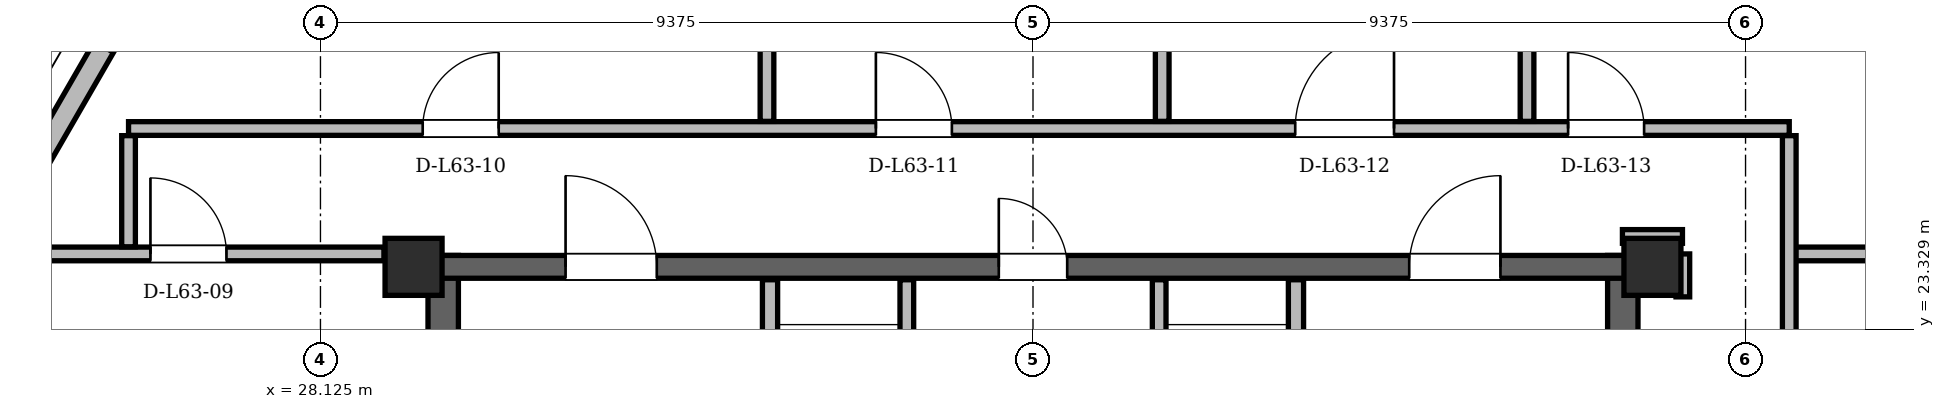
"""IFC4 building model, lengths in metres.
Left out: names, types, materials, properties, quantities, classifications, styles, units other than length and angle.
Written with IfcOpenShell. Run it as: python <this file> out.ifc"""

import sys

from ifc_helpers import new_model, si_unit, direction, frame, frame_2d, origin, origin_2d, place, context, subcontext, project, spatial, rectangle, hollow_rectangle, extrude, element, fill, save


model = new_model("IFC4")
c1 = context("Model", 3, precision=1e-05, world=origin(), true_north=direction((0.0, 1.0)))
c2 = subcontext(c1, "Body", "Model", "MODEL_VIEW")
j1 = project(units=[si_unit("LENGTHUNIT", "METRE"), si_unit("PLANEANGLEUNIT", "RADIAN")], contexts=[c1])
p1 = place(None, origin())
s1 = spatial("IfcSite", under=j1, at=p1, CompositionType="ELEMENT")
p2 = place(p1, origin())
s2 = spatial("IfcBuilding", under=s1, at=p2, CompositionType="ELEMENT")
p3 = place(p2, frame((0.0, 0.0, 237.9)))
s3 = spatial("IfcBuildingStorey", under=s2, at=p3, CompositionType="ELEMENT", Elevation=237.9)
for number, where, z_axis, x_axis in (
    (1, (45.65, 24.15, 0.0), (0.0, 0.0, 1.0), (1.0, 0.0, 0.0)),
    (2, (29.35, 24.15, 0.0), (0.0, 0.0, 1.0), (1.0, 0.0, 0.0)),
):
    element("IfcColumn", number, at=place(p3, frame(where, z_axis=z_axis, x_axis=x_axis)), inside=s3, PredefinedType="COLUMN", context=c2, shape_type="SweptSolid", body=[
        extrude(hollow_rectangle(XDim=0.75, YDim=0.75, WallThickness=0.06, at=origin_2d()), origin(), (0.0, 0.0, 1.0), 3.6),
    ])
for number, where, z_axis, x_axis in (
    (3, (29.74, 11.0, 0.0), (0.0, 0.0, 1.0), (0.0, 1.0, 0.0)),
    (4, (45.26, 11.0, 0.0), (0.0, 0.0, 1.0), (0.0, 1.0, 0.0)),
):
    element("IfcWall", number, at=place(p3, frame(where, z_axis=z_axis, x_axis=x_axis)), inside=s3, PredefinedType="SHEAR", context=c2, shape_type="SweptSolid", body=[
        extrude(rectangle(XDim=13.3, YDim=0.4, at=frame_2d((6.65, 0.0))), origin(), (0.0, 0.0, 1.0), 3.38),
    ])
p4 = place(p3, frame((29.65, 24.15, 0.0), z_axis=(0.0, 0.0, 1.0), x_axis=(1.0, 0.0, 0.0)))
e5 = element("IfcWall", 5, at=p4, inside=s3, PredefinedType="SHEAR", context=c2, shape_type="SweptSolid", body=[
    extrude(rectangle(XDim=15.7, YDim=0.3, at=frame_2d((7.85, 0.0))), origin(), (0.0, 0.0, 1.0), 3.38),
])
p5 = place(p4, frame((1.7, 0.0, 0.0)))
e6 = element("IfcOpeningElement", 6, at=p5, cuts=e5, PredefinedType="OPENING", context=c2, shape_type="SweptSolid", body=[
    extrude(rectangle(XDim=1.2, YDim=2.2, at=frame_2d((0.6, 1.1))), frame((0.0, 0.15, 0.0), z_axis=(0.0, -1.0, 0.0), x_axis=(1.0, 0.0, 0.0)), (0.0, 0.0, 1.0), 0.3),
])
p6 = place(p4, frame((12.8, 0.0, 0.0)))
e7 = element("IfcOpeningElement", 7, at=p6, cuts=e5, PredefinedType="OPENING", context=c2, shape_type="SweptSolid", body=[
    extrude(rectangle(XDim=1.2, YDim=2.2, at=frame_2d((0.6, 1.1))), frame((0.0, 0.15, 0.0), z_axis=(0.0, -1.0, 0.0), x_axis=(1.0, 0.0, 0.0)), (0.0, 0.0, 1.0), 0.3),
])
p7 = place(p4, frame((7.4, 0.0, 0.0)))
e8 = element("IfcOpeningElement", 8, at=p7, cuts=e5, PredefinedType="OPENING", context=c2, shape_type="SweptSolid", body=[
    extrude(rectangle(XDim=0.9, YDim=2.05, at=frame_2d((0.45, 1.025))), frame((0.0, 0.15, 0.0), z_axis=(0.0, -1.0, 0.0), x_axis=(1.0, 0.0, 0.0)), (0.0, 0.0, 1.0), 0.3),
])
p8 = place(p3, frame((58.899, 11.151, 0.0), z_axis=(0.0, 0.0, 1.0), x_axis=(-0.500002325133, 0.866024061364, 0.0)))
e9 = element("IfcWall", 9, at=p8, inside=s3, PredefinedType="SOLIDWALL", context=c2, shape_type="SweptSolid", body=[
    extrude(rectangle(XDim=36.9, YDim=0.29, at=frame_2d((18.45, 0.0))), origin(), (0.0, 0.0, 1.0), 2.677),
])
p9 = place(p8, frame((3.429, 0.0, 0.0)))
e10 = element("IfcOpeningElement", 10, at=p9, cuts=e9, PredefinedType="OPENING", context=c2, shape_type="SweptSolid", body=[
    extrude(rectangle(XDim=1.5, YDim=2.2, at=frame_2d((0.75, 1.1))), frame((0.0, 0.145, 0.0), z_axis=(0.0, -1.0, 0.0), x_axis=(1.0, 0.0, 0.0)), (0.0, 0.0, 1.0), 0.29),
])
p10 = place(p8, frame((27.156, 0.0, 0.0)))
e11 = element("IfcOpeningElement", 11, at=p10, cuts=e9, PredefinedType="OPENING", context=c2, shape_type="SweptSolid", body=[
    extrude(rectangle(XDim=1.5, YDim=2.2, at=frame_2d((0.75, 1.1))), frame((0.0, 0.145, 0.0), z_axis=(0.0, -1.0, 0.0), x_axis=(1.0, 0.0, 0.0)), (0.0, 0.0, 1.0), 0.29),
])
p11 = place(p8, frame((6.97, 0.0, 0.85)))
e12 = element("IfcOpeningElement", 12, at=p11, cuts=e9, PredefinedType="OPENING", context=c2, shape_type="SweptSolid", body=[
    extrude(rectangle(XDim=1.6, YDim=1.7, at=frame_2d((0.8, 0.85))), frame((0.0, 0.145, 0.0), z_axis=(0.0, -1.0, 0.0), x_axis=(1.0, 0.0, 0.0)), (0.0, 0.0, 1.0), 0.29),
])
p12 = place(p8, frame((1.106, 0.0, 0.85)))
e13 = element("IfcOpeningElement", 13, at=p12, cuts=e9, PredefinedType="OPENING", context=c2, shape_type="SweptSolid", body=[
    extrude(rectangle(XDim=1.6, YDim=1.7, at=frame_2d((0.8, 0.85))), frame((0.0, 0.145, 0.0), z_axis=(0.0, -1.0, 0.0), x_axis=(1.0, 0.0, 0.0)), (0.0, 0.0, 1.0), 0.29),
])
p13 = place(p8, frame((34.697, 0.0, 0.85)))
e14 = element("IfcOpeningElement", 14, at=p13, cuts=e9, PredefinedType="OPENING", context=c2, shape_type="SweptSolid", body=[
    extrude(rectangle(XDim=1.2, YDim=1.48, at=frame_2d((0.6, 0.74))), frame((0.0, 0.145, 0.0), z_axis=(0.0, -1.0, 0.0), x_axis=(1.0, 0.0, 0.0)), (0.0, 0.0, 1.0), 0.29),
])
p14 = place(p8, frame((16.774, 0.0, 0.85)))
e15 = element("IfcOpeningElement", 15, at=p14, cuts=e9, PredefinedType="OPENING", context=c2, shape_type="SweptSolid", body=[
    extrude(rectangle(XDim=2.2, YDim=1.717, at=frame_2d((1.1, 0.858))), frame((0.0, 0.145, 0.0), z_axis=(0.0, -1.0, 0.0), x_axis=(1.0, 0.0, 0.0)), (0.0, 0.0, 1.0), 0.29),
])
p15 = place(p8, frame((22.799, 0.0, 0.85)))
e16 = element("IfcOpeningElement", 16, at=p15, cuts=e9, PredefinedType="OPENING", context=c2, shape_type="SweptSolid", body=[
    extrude(rectangle(XDim=1.6, YDim=1.7, at=frame_2d((0.8, 0.85))), frame((0.0, 0.145, 0.0), z_axis=(0.0, -1.0, 0.0), x_axis=(1.0, 0.0, 0.0)), (0.0, 0.0, 1.0), 0.29),
])
p16 = place(p8, frame((29.059, 0.0, 0.85)))
e17 = element("IfcOpeningElement", 17, at=p16, cuts=e9, PredefinedType="OPENING", context=c2, shape_type="SweptSolid", body=[
    extrude(rectangle(XDim=1.2, YDim=1.48, at=frame_2d((0.6, 0.74))), frame((0.0, 0.145, 0.0), z_axis=(0.0, -1.0, 0.0), x_axis=(1.0, 0.0, 0.0)), (0.0, 0.0, 1.0), 0.29),
])
p17 = place(p8, frame((31.635, 0.0, 0.85)))
e18 = element("IfcOpeningElement", 18, at=p17, cuts=e9, PredefinedType="OPENING", context=c2, shape_type="SweptSolid", body=[
    extrude(rectangle(XDim=1.2, YDim=1.48, at=frame_2d((0.6, 0.74))), frame((0.0, 0.145, 0.0), z_axis=(0.0, -1.0, 0.0), x_axis=(1.0, 0.0, 0.0)), (0.0, 0.0, 1.0), 0.29),
])
p18 = place(p8, frame((12.419, 0.0, 0.85)))
e19 = element("IfcOpeningElement", 19, at=p18, cuts=e9, PredefinedType="OPENING", context=c2, shape_type="SweptSolid", body=[
    extrude(rectangle(XDim=1.2, YDim=1.48, at=frame_2d((0.6, 0.74))), frame((0.0, 0.145, 0.0), z_axis=(0.0, -1.0, 0.0), x_axis=(1.0, 0.0, 0.0)), (0.0, 0.0, 1.0), 0.29),
])
p19 = place(p3, frame((34.551, 43.107, 0.0), z_axis=(0.0, 0.0, 1.0), x_axis=(-0.500002325133, -0.866024061364, 0.0)))
e20 = element("IfcWall", 20, at=p19, inside=s3, PredefinedType="SOLIDWALL", context=c2, shape_type="SweptSolid", body=[
    extrude(rectangle(XDim=36.9, YDim=0.29, at=frame_2d((18.45, 0.0))), origin(), (0.0, 0.0, 1.0), 2.677),
])
p20 = place(p19, frame((3.429, 0.0, 0.0)))
e21 = element("IfcOpeningElement", 21, at=p20, cuts=e20, PredefinedType="OPENING", context=c2, shape_type="SweptSolid", body=[
    extrude(rectangle(XDim=1.5, YDim=2.2, at=frame_2d((0.75, 1.1))), frame((0.0, 0.145, 0.0), z_axis=(0.0, -1.0, 0.0), x_axis=(1.0, 0.0, 0.0)), (0.0, 0.0, 1.0), 0.29),
])
p21 = place(p19, frame((28.625, 0.0, 0.0)))
e22 = element("IfcOpeningElement", 22, at=p21, cuts=e20, PredefinedType="OPENING", context=c2, shape_type="SweptSolid", body=[
    extrude(rectangle(XDim=1.5, YDim=2.2, at=frame_2d((0.75, 1.1))), frame((0.0, 0.145, 0.0), z_axis=(0.0, -1.0, 0.0), x_axis=(1.0, 0.0, 0.0)), (0.0, 0.0, 1.0), 0.29),
])
p22 = place(p19, frame((21.887, 0.0, 0.85)))
e23 = element("IfcOpeningElement", 23, at=p22, cuts=e20, PredefinedType="OPENING", context=c2, shape_type="SweptSolid", body=[
    extrude(rectangle(XDim=2.4, YDim=1.717, at=frame_2d((1.2, 0.858))), frame((0.0, 0.145, 0.0), z_axis=(0.0, -1.0, 0.0), x_axis=(1.0, 0.0, 0.0)), (0.0, 0.0, 1.0), 0.29),
])
p23 = place(p19, frame((34.716, 0.0, 0.85)))
e24 = element("IfcOpeningElement", 24, at=p23, cuts=e20, PredefinedType="OPENING", context=c2, shape_type="SweptSolid", body=[
    extrude(rectangle(XDim=1.2, YDim=1.48, at=frame_2d((0.6, 0.74))), frame((0.0, 0.145, 0.0), z_axis=(0.0, -1.0, 0.0), x_axis=(1.0, 0.0, 0.0)), (0.0, 0.0, 1.0), 0.29),
])
p24 = place(p19, frame((32.59, 0.0, 0.85)))
e25 = element("IfcOpeningElement", 25, at=p24, cuts=e20, PredefinedType="OPENING", context=c2, shape_type="SweptSolid", body=[
    extrude(rectangle(XDim=1.2, YDim=1.48, at=frame_2d((0.6, 0.74))), frame((0.0, 0.145, 0.0), z_axis=(0.0, -1.0, 0.0), x_axis=(1.0, 0.0, 0.0)), (0.0, 0.0, 1.0), 0.29),
])
p25 = place(p19, frame((12.187, 0.0, 0.85)))
e26 = element("IfcOpeningElement", 26, at=p25, cuts=e20, PredefinedType="OPENING", context=c2, shape_type="SweptSolid", body=[
    extrude(rectangle(XDim=1.2, YDim=1.48, at=frame_2d((0.6, 0.74))), frame((0.0, 0.145, 0.0), z_axis=(0.0, -1.0, 0.0), x_axis=(1.0, 0.0, 0.0)), (0.0, 0.0, 1.0), 0.29),
])
p26 = place(p19, frame((16.565, 0.0, 0.85)))
e27 = element("IfcOpeningElement", 27, at=p26, cuts=e20, PredefinedType="OPENING", context=c2, shape_type="SweptSolid", body=[
    extrude(rectangle(XDim=2.0, YDim=1.717, at=frame_2d((1.0, 0.858))), frame((0.0, 0.145, 0.0), z_axis=(0.0, -1.0, 0.0), x_axis=(1.0, 0.0, 0.0)), (0.0, 0.0, 1.0), 0.29),
])
p27 = place(p19, frame((6.94, 0.0, 0.85)))
e28 = element("IfcOpeningElement", 28, at=p27, cuts=e20, PredefinedType="OPENING", context=c2, shape_type="SweptSolid", body=[
    extrude(rectangle(XDim=1.2, YDim=1.48, at=frame_2d((0.6, 0.74))), frame((0.0, 0.145, 0.0), z_axis=(0.0, -1.0, 0.0), x_axis=(1.0, 0.0, 0.0)), (0.0, 0.0, 1.0), 0.29),
])
p28 = place(p3, frame((34.04, 19.48, 0.0), z_axis=(0.0, 0.0, 1.0), x_axis=(0.0, 1.0, 0.0)))
e29 = element("IfcWall", 29, at=p28, inside=s3, PredefinedType="PARTITIONING", context=c2, shape_type="SweptSolid", body=[
    extrude(rectangle(XDim=4.5, YDim=0.2, at=frame_2d((2.25, 0.0))), origin(), (0.0, 0.0, 1.0), 3.38),
])
p29 = place(p28, frame((2.12, 0.0, 0.0)))
e30 = element("IfcOpeningElement", 30, at=p29, cuts=e29, PredefinedType="OPENING", context=c2, shape_type="SweptSolid", body=[
    extrude(rectangle(XDim=1.1, YDim=2.2, at=frame_2d((0.55, 1.1))), frame((0.0, 0.1, 0.0), z_axis=(0.0, -1.0, 0.0), x_axis=(1.0, 0.0, 0.0)), (0.0, 0.0, 1.0), 0.2),
])
p30 = place(p3, frame((35.84, 20.96, 0.0), z_axis=(0.0, 0.0, 1.0), x_axis=(0.0, 1.0, 0.0)))
e31 = element("IfcWall", 31, at=p30, inside=s3, PredefinedType="PARTITIONING", context=c2, shape_type="SweptSolid", body=[
    extrude(rectangle(XDim=3.02, YDim=0.18, at=frame_2d((1.51, 0.0))), origin(), (0.0, 0.0, 1.0), 3.38),
])
p31 = place(p3, frame((40.96, 19.48, 0.0), z_axis=(0.0, 0.0, 1.0), x_axis=(0.0, 1.0, 0.0)))
e32 = element("IfcWall", 32, at=p31, inside=s3, PredefinedType="PARTITIONING", context=c2, shape_type="SweptSolid", body=[
    extrude(rectangle(XDim=4.5, YDim=0.2, at=frame_2d((2.25, 0.0))), origin(), (0.0, 0.0, 1.0), 3.38),
])
p32 = place(p31, frame((2.12, 0.0, 0.0)))
e33 = element("IfcOpeningElement", 33, at=p32, cuts=e32, PredefinedType="OPENING", context=c2, shape_type="SweptSolid", body=[
    extrude(rectangle(XDim=1.1, YDim=2.2, at=frame_2d((0.55, 1.1))), frame((0.0, 0.1, 0.0), z_axis=(0.0, -1.0, 0.0), x_axis=(1.0, 0.0, 0.0)), (0.0, 0.0, 1.0), 0.2),
])
p33 = place(p3, frame((39.16, 20.96, 0.0), z_axis=(0.0, 0.0, 1.0), x_axis=(0.0, 1.0, 0.0)))
e34 = element("IfcWall", 34, at=p33, inside=s3, PredefinedType="PARTITIONING", context=c2, shape_type="SweptSolid", body=[
    extrude(rectangle(XDim=3.02, YDim=0.18, at=frame_2d((1.51, 0.0))), origin(), (0.0, 0.0, 1.0), 3.38),
])
p34 = place(p3, frame((23.876, 24.32, 0.0), z_axis=(0.0, 0.0, 1.0), x_axis=(1.0, 0.0, 0.0)))
e35 = element("IfcWall", 35, at=p34, inside=s3, PredefinedType="PARTITIONING", context=c2, shape_type="SweptSolid", body=[
    extrude(rectangle(XDim=5.084, YDim=0.18, at=frame_2d((2.542, 0.0))), origin(), (0.0, 0.0, 1.0), 3.38),
])
p35 = place(p34, frame((2.012, 0.0, 0.0)))
e36 = element("IfcOpeningElement", 36, at=p35, cuts=e35, PredefinedType="OPENING", context=c2, shape_type="SweptSolid", body=[
    extrude(rectangle(XDim=1.0, YDim=2.18, at=frame_2d((0.5, 1.09))), frame((0.0, 0.09, 0.0), z_axis=(0.0, -1.0, 0.0), x_axis=(1.0, 0.0, 0.0)), (0.0, 0.0, 1.0), 0.18),
])
p36 = place(p3, frame((47.45, 24.32, 0.0), z_axis=(0.0, 0.0, 1.0), x_axis=(1.0, 0.0, 0.0)))
e37 = element("IfcWall", 37, at=p36, inside=s3, PredefinedType="PARTITIONING", context=c2, shape_type="SweptSolid", body=[
    extrude(rectangle(XDim=3.674, YDim=0.18, at=frame_2d((1.837, 0.0))), origin(), (0.0, 0.0, 1.0), 3.38),
])
p37 = place(p3, frame((45.255, 24.55, 0.0), z_axis=(0.0, 0.0, 1.0), x_axis=(1.0, 0.0, 0.0)))
e38 = element("IfcWall", 38, at=p37, inside=s3, PredefinedType="PARTITIONING", context=c2, shape_type="SweptSolid", body=[
    extrude(rectangle(XDim=0.79, YDim=0.18, at=frame_2d((0.395, 0.0))), origin(), (0.0, 0.0, 1.0), 2.913),
])
p38 = place(p3, frame((25.6, 25.97, 0.0), z_axis=(0.0, 0.0, 1.0), x_axis=(1.0, 0.0, 0.0)))
e39 = element("IfcWall", 39, at=p38, inside=s3, PredefinedType="PARTITIONING", context=c2, shape_type="SweptSolid", body=[
    extrude(rectangle(XDim=21.85, YDim=0.18, at=frame_2d((10.925, 0.0))), origin(), (0.0, 0.0, 1.0), 2.913),
])
p39 = place(p38, frame((3.87, 0.0, 0.0)))
e40 = element("IfcOpeningElement", 40, at=p39, cuts=e39, PredefinedType="OPENING", context=c2, shape_type="SweptSolid", body=[
    extrude(rectangle(XDim=1.0, YDim=2.18, at=frame_2d((0.5, 1.09))), frame((0.0, 0.09, 0.0), z_axis=(0.0, -1.0, 0.0), x_axis=(1.0, 0.0, 0.0)), (0.0, 0.0, 1.0), 0.18),
])
p40 = place(p38, frame((9.833, 0.0, 0.0)))
e41 = element("IfcOpeningElement", 41, at=p40, cuts=e39, PredefinedType="OPENING", context=c2, shape_type="SweptSolid", body=[
    extrude(rectangle(XDim=1.0, YDim=2.18, at=frame_2d((0.5, 1.09))), frame((0.0, 0.09, 0.0), z_axis=(0.0, -1.0, 0.0), x_axis=(1.0, 0.0, 0.0)), (0.0, 0.0, 1.0), 0.18),
])
p41 = place(p38, frame((15.35, 0.0, 0.0)))
e42 = element("IfcOpeningElement", 42, at=p41, cuts=e39, PredefinedType="OPENING", context=c2, shape_type="SweptSolid", body=[
    extrude(rectangle(XDim=1.3, YDim=2.2, at=frame_2d((0.65, 1.1))), frame((0.0, 0.09, 0.0), z_axis=(0.0, -1.0, 0.0), x_axis=(1.0, 0.0, 0.0)), (0.0, 0.0, 1.0), 0.18),
])
p42 = place(p38, frame((18.94, 0.0, 0.0)))
e43 = element("IfcOpeningElement", 43, at=p42, cuts=e39, PredefinedType="OPENING", context=c2, shape_type="SweptSolid", body=[
    extrude(rectangle(XDim=1.0, YDim=2.18, at=frame_2d((0.5, 1.09))), frame((0.0, 0.09, 0.0), z_axis=(0.0, -1.0, 0.0), x_axis=(1.0, 0.0, 0.0)), (0.0, 0.0, 1.0), 0.18),
])
p43 = place(p3, frame((25.6, 24.414, 0.0), z_axis=(0.0, 0.0, 1.0), x_axis=(0.0, 1.0, 0.0)))
e44 = element("IfcWall", 44, at=p43, inside=s3, PredefinedType="PARTITIONING", context=c2, shape_type="SweptSolid", body=[
    extrude(rectangle(XDim=1.462, YDim=0.18, at=frame_2d((0.731, 0.0))), origin(), (0.0, 0.0, 1.0), 3.38),
])
p44 = place(p3, frame((34.0, 26.064, 0.0), z_axis=(0.0, 0.0, 1.0), x_axis=(0.0, 1.0, 0.0)))
e45 = element("IfcWall", 45, at=p44, inside=s3, PredefinedType="PARTITIONING", context=c2, shape_type="SweptSolid", body=[
    extrude(rectangle(XDim=15.791, YDim=0.18, at=frame_2d((7.896, 0.0))), origin(), (0.0, 0.0, 1.0), 2.913),
])
p45 = place(p3, frame((39.2, 26.064, 0.0), z_axis=(0.0, 0.0, 1.0), x_axis=(0.0, 1.0, 0.0)))
e46 = element("IfcWall", 46, at=p45, inside=s3, PredefinedType="PARTITIONING", context=c2, shape_type="SweptSolid", body=[
    extrude(rectangle(XDim=4.312, YDim=0.18, at=frame_2d((2.156, 0.0))), origin(), (0.0, 0.0, 1.0), 3.38),
])
p46 = place(p3, frame((44.0, 26.064, 0.0), z_axis=(0.0, 0.0, 1.0), x_axis=(0.0, 1.0, 0.0)))
e47 = element("IfcWall", 47, at=p46, inside=s3, PredefinedType="PARTITIONING", context=c2, shape_type="SweptSolid", body=[
    extrude(rectangle(XDim=4.312, YDim=0.18, at=frame_2d((2.156, 0.0))), origin(), (0.0, 0.0, 1.0), 2.913),
])
p47 = place(p3, frame((46.05, 23.755, 0.0), z_axis=(0.0, 0.0, 1.0), x_axis=(0.0, 1.0, 0.0)))
e48 = element("IfcWall", 48, at=p47, inside=s3, PredefinedType="PARTITIONING", context=c2, shape_type="SweptSolid", body=[
    extrude(rectangle(XDim=0.565, YDim=0.18, at=frame_2d((0.283, 0.0))), origin(), (0.0, 0.0, 1.0), 3.38),
])
p48 = place(p3, frame((47.45, 9.394, 0.0), z_axis=(0.0, 0.0, 1.0), x_axis=(0.0, 1.0, 0.0)))
e49 = element("IfcWall", 49, at=p48, inside=s3, PredefinedType="PARTITIONING", context=c2, shape_type="SweptSolid", body=[
    extrude(rectangle(XDim=16.482, YDim=0.18, at=frame_2d((8.241, 0.0))), origin(), (0.0, 0.0, 1.0), 2.913),
])
p49 = place(p48, frame((6.247, 0.0, 0.0)))
e50 = element("IfcOpeningElement", 50, at=p49, cuts=e49, PredefinedType="OPENING", context=c2, shape_type="SweptSolid", body=[
    extrude(rectangle(XDim=1.0, YDim=2.18, at=frame_2d((0.5, 1.09))), frame((0.0, 0.09, 0.0), z_axis=(0.0, -1.0, 0.0), x_axis=(1.0, 0.0, 0.0)), (0.0, 0.0, 1.0), 0.18),
])
p50 = place(p48, frame((10.379, 0.0, 0.0)))
e51 = element("IfcOpeningElement", 51, at=p50, cuts=e49, PredefinedType="OPENING", context=c2, shape_type="SweptSolid", body=[
    extrude(rectangle(XDim=1.0, YDim=2.18, at=frame_2d((0.5, 1.09))), frame((0.0, 0.09, 0.0), z_axis=(0.0, -1.0, 0.0), x_axis=(1.0, 0.0, 0.0)), (0.0, 0.0, 1.0), 0.18),
])
p51 = place(p5, origin())
e52 = element("IfcDoor", 52, at=p51, inside=s3, OperationType="SINGLE_SWING_LEFT", PredefinedType="DOOR", context=c2, shape_type="SweptSolid", body=[
    extrude(rectangle(XDim=1.2, YDim=2.2, at=frame_2d((0.6, 1.1))), frame((0.0, 0.025, 0.0), z_axis=(0.0, -1.0, 0.0), x_axis=(1.0, 0.0, 0.0)), (0.0, 0.0, 1.0), 0.05),
])
fill(e6, e52)
p52 = place(p6, origin())
e53 = element("IfcDoor", 53, at=p52, inside=s3, OperationType="SINGLE_SWING_RIGHT", PredefinedType="DOOR", context=c2, shape_type="SweptSolid", body=[
    extrude(rectangle(XDim=1.2, YDim=2.2, at=frame_2d((0.6, 1.1))), frame((0.0, 0.025, 0.0), z_axis=(0.0, -1.0, 0.0), x_axis=(1.0, 0.0, 0.0)), (0.0, 0.0, 1.0), 0.05),
])
fill(e7, e53)
p53 = place(p7, origin())
e54 = element("IfcDoor", 54, at=p53, inside=s3, OperationType="SINGLE_SWING_LEFT", PredefinedType="DOOR", context=c2, shape_type="SweptSolid", body=[
    extrude(rectangle(XDim=0.9, YDim=2.05, at=frame_2d((0.45, 1.025))), frame((0.0, 0.025, 0.0), z_axis=(0.0, -1.0, 0.0), x_axis=(1.0, 0.0, 0.0)), (0.0, 0.0, 1.0), 0.05),
])
fill(e8, e54)
p54 = place(p35, origin())
e55 = element("IfcDoor", 55, at=p54, inside=s3, OperationType="SINGLE_SWING_LEFT", PredefinedType="DOOR", context=c2, shape_type="SweptSolid", body=[
    extrude(rectangle(XDim=1.0, YDim=2.18, at=frame_2d((0.5, 1.09))), frame((0.0, 0.025, 0.0), z_axis=(0.0, -1.0, 0.0), x_axis=(1.0, 0.0, 0.0)), (0.0, 0.0, 1.0), 0.05),
])
fill(e36, e55)
p55 = place(p39, origin())
e56 = element("IfcDoor", 56, at=p55, inside=s3, OperationType="SINGLE_SWING_RIGHT", PredefinedType="DOOR", context=c2, shape_type="SweptSolid", body=[
    extrude(rectangle(XDim=1.0, YDim=2.18, at=frame_2d((0.5, 1.09))), frame((0.0, 0.025, 0.0), z_axis=(0.0, -1.0, 0.0), x_axis=(1.0, 0.0, 0.0)), (0.0, 0.0, 1.0), 0.05),
])
fill(e40, e56)
p56 = place(p40, origin())
e57 = element("IfcDoor", 57, at=p56, inside=s3, OperationType="SINGLE_SWING_LEFT", PredefinedType="DOOR", context=c2, shape_type="SweptSolid", body=[
    extrude(rectangle(XDim=1.0, YDim=2.18, at=frame_2d((0.5, 1.09))), frame((0.0, 0.025, 0.0), z_axis=(0.0, -1.0, 0.0), x_axis=(1.0, 0.0, 0.0)), (0.0, 0.0, 1.0), 0.05),
])
fill(e41, e57)
p57 = place(p41, origin())
e58 = element("IfcDoor", 58, at=p57, inside=s3, OperationType="SINGLE_SWING_RIGHT", PredefinedType="DOOR", context=c2, shape_type="SweptSolid", body=[
    extrude(rectangle(XDim=1.3, YDim=2.2, at=frame_2d((0.65, 1.1))), frame((0.0, 0.025, 0.0), z_axis=(0.0, -1.0, 0.0), x_axis=(1.0, 0.0, 0.0)), (0.0, 0.0, 1.0), 0.05),
])
fill(e42, e58)
p58 = place(p42, origin())
e59 = element("IfcDoor", 59, at=p58, inside=s3, OperationType="SINGLE_SWING_LEFT", PredefinedType="DOOR", context=c2, shape_type="SweptSolid", body=[
    extrude(rectangle(XDim=1.0, YDim=2.18, at=frame_2d((0.5, 1.09))), frame((0.0, 0.025, 0.0), z_axis=(0.0, -1.0, 0.0), x_axis=(1.0, 0.0, 0.0)), (0.0, 0.0, 1.0), 0.05),
])
fill(e43, e59)
save(model, sys.argv[1])
